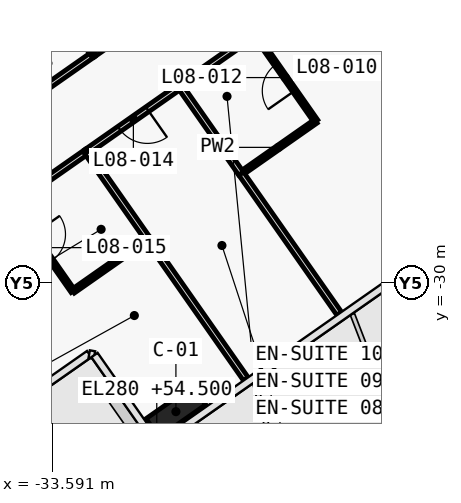
"""IFC4 building model, lengths in metres.
Left out: names, types, materials, properties, quantities, classifications, styles, units other than length and angle.
Written with IfcOpenShell. Run it as: python <this file> out.ifc"""

import sys

from ifc_helpers import new_model, si_unit, direction, frame, frame_2d, origin, origin_2d, place, context, subcontext, project, spatial, rectangle, extrude, element, fill, save


model = new_model("IFC4")
c1 = context("Model", 3, precision=1e-05, world=origin(), true_north=direction((0.0, 1.0)))
c2 = subcontext(c1, "Body", "Model", "MODEL_VIEW")
j1 = project(units=[si_unit("LENGTHUNIT", "METRE"), si_unit("PLANEANGLEUNIT", "RADIAN")], contexts=[c1])
p1 = place(None, origin())
s1 = spatial("IfcSite", under=j1, at=p1, CompositionType="ELEMENT")
p2 = place(p1, origin())
s2 = spatial("IfcBuilding", under=s1, at=p2, CompositionType="ELEMENT")
p3 = place(p2, frame((0.0, 0.0, 54.5)))
s3 = spatial("IfcBuildingStorey", under=s2, at=p3, CompositionType="ELEMENT", Elevation=54.5)
p4 = place(p3, frame((-30.336, -33.388, 0.0), z_axis=(0.0, 0.0, 1.0), x_axis=(-0.819152044289, -0.573576436351, 0.0)))
e1 = element("IfcColumn", 1, at=p4, inside=s3, PredefinedType="COLUMN", context=c2, shape_type="SweptSolid", body=[
    extrude(rectangle(XDim=1.5, YDim=0.6, at=origin_2d()), origin(), (0.0, 0.0, 1.0), 3.6),
])
p5 = place(p3, frame((-32.521, -23.992, 0.0), z_axis=(0.0, 0.0, 1.0), x_axis=(0.819199220913, 0.573509055252, 0.0)))
e2 = element("IfcWall", 2, at=p5, inside=s3, PredefinedType="PARTITIONING", context=c2, shape_type="SweptSolid", body=[
    extrude(rectangle(XDim=1.403, YDim=0.15, at=frame_2d((0.702, 0.0))), origin(), (0.0, 0.0, 1.0), 3.32),
])
p6 = place(p5, frame((0.201, 0.0, 0.0)))
e3 = element("IfcOpeningElement", 3, at=p6, cuts=e2, PredefinedType="OPENING", context=c2, shape_type="SweptSolid", body=[
    extrude(rectangle(XDim=1.0, YDim=2.1, at=frame_2d((0.5, 1.05))), frame((0.0, 0.085, 0.0), z_axis=(0.0, -1.0, 0.0), x_axis=(1.0, 0.0, 0.0)), (0.0, 0.0, 1.0), 0.17),
])
p7 = place(p3, frame((-33.833, -24.91, 0.0), z_axis=(0.0, 0.0, 1.0), x_axis=(0.819189013667, 0.573523634986, 0.0)))
e4 = element("IfcWall", 4, at=p7, inside=s3, PredefinedType="PARTITIONING", context=c2, shape_type="SweptSolid", body=[
    extrude(rectangle(XDim=1.604, YDim=0.15, at=frame_2d((0.802, 0.0))), origin(), (0.0, 0.0, 1.0), 3.32),
])
p8 = place(p3, frame((-28.259, -23.449, 0.0), z_axis=(0.0, 0.0, 1.0), x_axis=(-0.819146032251, -0.573585022335, 0.0)))
e5 = element("IfcWall", 5, at=p8, inside=s3, PredefinedType="PARTITIONING", context=c2, shape_type="SweptSolid", body=[
    extrude(rectangle(XDim=2.404, YDim=0.15, at=frame_2d((1.202, 0.0))), origin(), (0.0, 0.0, 1.0), 3.32),
])
p9 = place(p3, frame((-30.225, -24.826, 0.0), z_axis=(0.0, 0.0, 1.0), x_axis=(-0.819128818764, -0.573609604409, 0.0)))
e6 = element("IfcWall", 6, at=p9, inside=s3, PredefinedType="PARTITIONING", context=c2, shape_type="SweptSolid", body=[
    extrude(rectangle(XDim=3.004, YDim=0.15, at=frame_2d((1.502, 0.0))), origin(), (0.0, 0.0, 1.0), 3.32),
])
p10 = place(p9, frame((1.052, 0.0, 0.0)))
e7 = element("IfcOpeningElement", 7, at=p10, cuts=e6, PredefinedType="OPENING", context=c2, shape_type="SweptSolid", body=[
    extrude(rectangle(XDim=0.9, YDim=2.1, at=frame_2d((0.45, 1.05))), frame((0.0, 0.085, 0.0), z_axis=(0.0, -1.0, 0.0), x_axis=(1.0, 0.0, 0.0)), (0.0, 0.0, 1.0), 0.17),
])
p11 = place(p3, frame((-32.682, -26.546, 0.0), z_axis=(0.0, 0.0, 1.0), x_axis=(-0.819179439794, -0.573537309527, 0.0)))
e8 = element("IfcWall", 8, at=p11, inside=s3, PredefinedType="PARTITIONING", context=c2, shape_type="SweptSolid", body=[
    extrude(rectangle(XDim=2.404, YDim=0.15, at=frame_2d((1.202, 0.0))), origin(), (0.0, 0.0, 1.0), 3.32),
])
p12 = place(p3, frame((-32.519, -23.991, 0.0), z_axis=(0.0, 0.0, 1.0), x_axis=(-0.573537965655, 0.819178980414, 0.0)))
e9 = element("IfcWall", 9, at=p12, inside=s3, PredefinedType="PARTITIONING", context=c2, shape_type="SweptSolid", body=[
    extrude(rectangle(XDim=2.6, YDim=0.12, at=frame_2d((1.3, 0.0))), origin(), (0.0, 0.0, 1.0), 2.6),
])
p13 = place(p12, frame((0.875, 0.0, 0.0)))
e10 = element("IfcOpeningElement", 10, at=p13, cuts=e9, PredefinedType="OPENING", context=c2, shape_type="SweptSolid", body=[
    extrude(rectangle(XDim=0.85, YDim=2.05, at=frame_2d((0.425, 1.025))), frame((0.0, 0.07, 0.0), z_axis=(0.0, -1.0, 0.0), x_axis=(1.0, 0.0, 0.0)), (0.0, 0.0, 1.0), 0.14),
])
p14 = place(p3, frame((-21.124, -27.365, 0.0), z_axis=(0.0, 0.0, 1.0), x_axis=(-0.573572324301, 0.819154923562, 0.0)))
e11 = element("IfcWall", 11, at=p14, inside=s3, PredefinedType="PARTITIONING", context=c2, shape_type="SweptSolid", body=[
    extrude(rectangle(XDim=7.3, YDim=0.15, at=frame_2d((3.65, 0.0))), origin(), (0.0, 0.0, 1.0), 2.5),
])
p15 = place(p3, frame((-28.62, -27.121, 0.0), z_axis=(0.0, 0.0, 1.0), x_axis=(0.819188907105, 0.573523787192, 0.0)))
e12 = element("IfcWall", 12, at=p15, inside=s3, PredefinedType="PARTITIONING", context=c2, shape_type="SweptSolid", body=[
    extrude(rectangle(XDim=2.4, YDim=0.12, at=frame_2d((1.2, 0.0))), origin(), (0.0, 0.0, 1.0), 3.32),
])
p16 = place(p3, frame((-26.653, -25.743, 0.0), z_axis=(0.0, 0.0, 1.0), x_axis=(-0.573608623498, 0.819129505664, 0.0)))
e13 = element("IfcWall", 13, at=p16, inside=s3, PredefinedType="PARTITIONING", context=c2, shape_type="SweptSolid", body=[
    extrude(rectangle(XDim=2.8, YDim=0.12, at=frame_2d((1.4, 0.0))), origin(), (0.0, 0.0, 1.0), 3.32),
])
p17 = place(p16, frame((0.975, 0.0, 0.0)))
e14 = element("IfcOpeningElement", 14, at=p17, cuts=e13, PredefinedType="OPENING", context=c2, shape_type="SweptSolid", body=[
    extrude(rectangle(XDim=0.85, YDim=2.05, at=frame_2d((0.425, 1.025))), frame((0.0, 0.07, 0.0), z_axis=(0.0, -1.0, 0.0), x_axis=(1.0, 0.0, 0.0)), (0.0, 0.0, 1.0), 0.14),
])
p18 = place(p3, frame((-26.039, -30.807, 0.0), z_axis=(0.0, 0.0, 1.0), x_axis=(-0.573589807488, 0.819142681555, 0.0)))
e15 = element("IfcWall", 15, at=p18, inside=s3, PredefinedType="PARTITIONING", context=c2, shape_type="SweptSolid", body=[
    extrude(rectangle(XDim=4.499, YDim=0.15, at=frame_2d((2.25, 0.0))), origin(), (0.0, 0.0, 1.0), 2.5),
])
p19 = place(p3, frame((-28.62, -27.121, 0.0), z_axis=(0.0, 0.0, 1.0), x_axis=(-0.573608623498, 0.819129505664, 0.0)))
e16 = element("IfcWall", 16, at=p19, inside=s3, PredefinedType="PARTITIONING", context=c2, shape_type="SweptSolid", body=[
    extrude(rectangle(XDim=2.8, YDim=0.15, at=frame_2d((1.4, 0.0))), origin(), (0.0, 0.0, 1.0), 3.32),
])
p20 = place(p3, frame((-28.497, -32.528, 0.0), z_axis=(0.0, 0.0, 1.0), x_axis=(-0.573556991349, 0.819165659482, 0.0)))
e17 = element("IfcWall", 17, at=p20, inside=s3, PredefinedType="PARTITIONING", context=c2, shape_type="SweptSolid", body=[
    extrude(rectangle(XDim=4.501, YDim=0.15, at=frame_2d((2.25, 0.0))), origin(), (0.0, 0.0, 1.0), 2.5),
])
p21 = place(p3, frame((-31.076, -28.843, 0.0), z_axis=(0.0, 0.0, 1.0), x_axis=(-0.573555899632, 0.819166423871, 0.0)))
e18 = element("IfcWall", 18, at=p21, inside=s3, PredefinedType="PARTITIONING", context=c2, shape_type="SweptSolid", body=[
    extrude(rectangle(XDim=2.802, YDim=0.15, at=frame_2d((1.401, 0.0))), origin(), (0.0, 0.0, 1.0), 3.32),
])
p22 = place(p3, frame((-34.65, -27.925, 0.0), z_axis=(0.0, 0.0, 1.0), x_axis=(0.573550118428, -0.819170471667, 0.0)))
e19 = element("IfcWall", 19, at=p22, inside=s3, PredefinedType="PARTITIONING", context=c2, shape_type="SweptSolid", body=[
    extrude(rectangle(XDim=2.8, YDim=0.12, at=frame_2d((1.4, 0.0))), origin(), (0.0, 0.0, 1.0), 3.32),
])
p23 = place(p22, frame((0.975, 0.0, 0.0)))
e20 = element("IfcOpeningElement", 20, at=p23, cuts=e19, PredefinedType="OPENING", context=c2, shape_type="SweptSolid", body=[
    extrude(rectangle(XDim=0.85, YDim=2.05, at=frame_2d((0.425, 1.025))), frame((0.0, 0.07, 0.0), z_axis=(0.0, -1.0, 0.0), x_axis=(1.0, 0.0, 0.0)), (0.0, 0.0, 1.0), 0.14),
])
p24 = place(p3, frame((-33.043, -30.219, 0.0), z_axis=(0.0, 0.0, 1.0), x_axis=(0.819107643868, 0.573639841501, 0.0)))
e21 = element("IfcWall", 21, at=p24, inside=s3, PredefinedType="PARTITIONING", context=c2, shape_type="SweptSolid", body=[
    extrude(rectangle(XDim=2.4, YDim=0.12, at=frame_2d((1.2, 0.0))), origin(), (0.0, 0.0, 1.0), 3.32),
])
p25 = place(p17, origin())
e22 = element("IfcDoor", 22, at=p25, inside=s3, OperationType="SINGLE_SWING_RIGHT", PredefinedType="DOOR", context=c2, shape_type="SweptSolid", body=[
    extrude(rectangle(XDim=0.85, YDim=2.05, at=frame_2d((0.425, 1.025))), frame((0.0, 0.025, 0.0), z_axis=(0.0, -1.0, 0.0), x_axis=(1.0, 0.0, 0.0)), (0.0, 0.0, 1.0), 0.05),
])
fill(e14, e22)
p26 = place(p10, origin())
e23 = element("IfcDoor", 23, at=p26, inside=s3, OperationType="SINGLE_SWING_LEFT", PredefinedType="DOOR", context=c2, shape_type="SweptSolid", body=[
    extrude(rectangle(XDim=0.9, YDim=2.1, at=frame_2d((0.45, 1.05))), frame((0.0, 0.025, 0.0), z_axis=(0.0, -1.0, 0.0), x_axis=(1.0, 0.0, 0.0)), (0.0, 0.0, 1.0), 0.05),
])
fill(e7, e23)
save(model, sys.argv[1])
